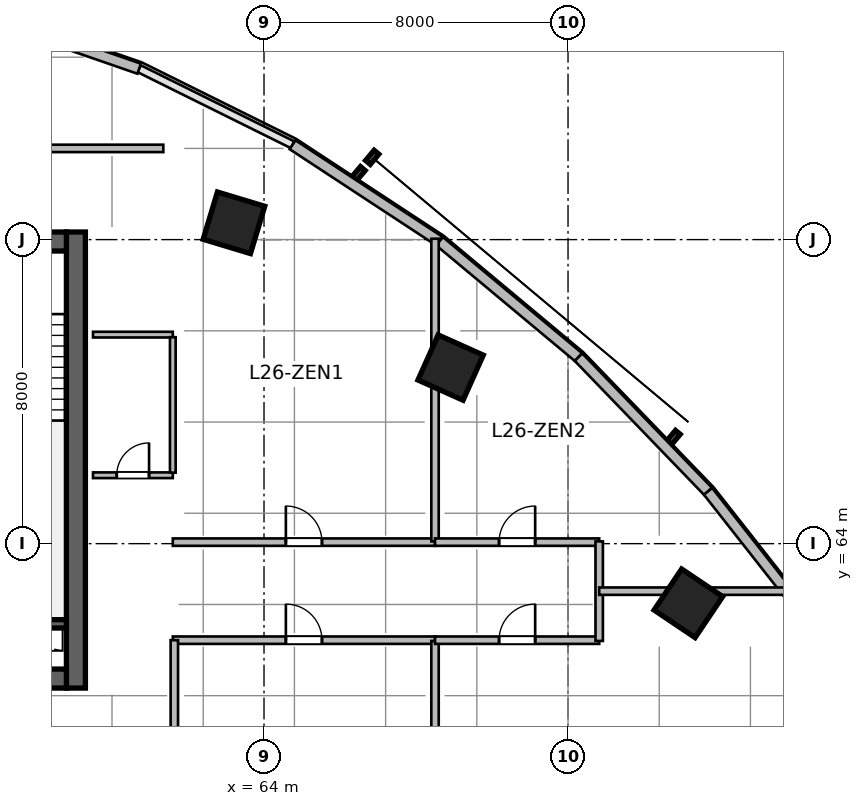
"""IFC4 building model, lengths in metres.
Left out: names, types, materials, properties, quantities, classifications, styles, units other than length and angle.
Written with IfcOpenShell. Run it as: python <this file> out.ifc"""

import sys

from ifc_helpers import new_model, si_unit, direction, frame, frame_2d, origin, origin_2d, place, context, subcontext, project, spatial, rectangle, extrude, source, transform, mapped, element, fill, save


model = new_model("IFC4")
c1 = context("Model", 3, precision=1e-05, world=origin(), true_north=direction((0.0, 1.0)))
c2 = subcontext(c1, "Body", "Model", "MODEL_VIEW")
j1 = project(units=[si_unit("LENGTHUNIT", "METRE"), si_unit("PLANEANGLEUNIT", "RADIAN")], contexts=[c1])
p1 = place(None, origin())
s1 = spatial("IfcSite", under=j1, at=p1, CompositionType="ELEMENT")
p2 = place(p1, origin())
s2 = spatial("IfcBuilding", under=s1, at=p2, CompositionType="ELEMENT")
p3 = place(p2, frame((0.0, 0.0, 111.6)))
s3 = spatial("IfcBuildingStorey", under=s2, at=p3, CompositionType="ELEMENT", Elevation=111.6)
m1 = source(origin(), c2, "Body", "SweptSolid", [
    extrude(rectangle(XDim=12.0, YDim=0.5, at=frame_2d((6.0, 0.0))), origin(), (0.0, 0.0, 1.0), 3.9),
])
p4 = place(p3, frame((59.05, 60.2, 0.0), z_axis=(0.0, 0.0, 1.0), x_axis=(0.0, 1.0, 0.0)))
e1 = element("IfcWall", 1, at=p4, inside=s3, PredefinedType="SHEAR", context=c2, shape_type="MappedRepresentation", body=[
    mapped(m1, transform((0.0, 0.0, 0.0), scale=1.0)),
])
m2 = source(origin(), c2, "Body", "SweptSolid", [
    extrude(rectangle(XDim=21.6, YDim=0.5, at=frame_2d((10.8, 0.0))), origin(), (0.0, 0.0, 1.0), 3.9),
])
p5 = place(p3, frame((37.2, 60.45, 0.0), z_axis=(0.0, 0.0, 1.0), x_axis=(1.0, 0.0, 0.0)))
e2 = element("IfcWall", 2, at=p5, inside=s3, PredefinedType="SHEAR", context=c2, shape_type="MappedRepresentation", body=[
    mapped(m2, transform((0.0, 0.0, 0.0), scale=1.0)),
])
p6 = place(p5, frame((1.1, 0.0, 0.0)))
e3 = element("IfcOpeningElement", 3, at=p6, cuts=e2, PredefinedType="OPENING", context=c2, shape_type="SweptSolid", body=[
    extrude(rectangle(XDim=1.15, YDim=2.15, at=frame_2d((0.575, 1.075))), frame((0.0, 0.26, 0.0), z_axis=(0.0, -1.0, 0.0), x_axis=(1.0, 0.0, 0.0)), (0.0, 0.0, 1.0), 0.52),
])
p7 = place(p5, frame((19.5, 0.0, 0.0)))
e4 = element("IfcOpeningElement", 4, at=p7, cuts=e2, PredefinedType="OPENING", context=c2, shape_type="SweptSolid", body=[
    extrude(rectangle(XDim=0.9, YDim=2.1, at=frame_2d((0.45, 1.05))), frame((0.0, 0.26, 0.0), z_axis=(0.0, -1.0, 0.0), x_axis=(1.0, 0.0, 0.0)), (0.0, 0.0, 1.0), 0.52),
])
p8 = place(p5, frame((12.02, 0.0, 0.0)))
e5 = element("IfcOpeningElement", 5, at=p8, cuts=e2, PredefinedType="OPENING", context=c2, shape_type="SweptSolid", body=[
    extrude(rectangle(XDim=1.6, YDim=2.15, at=frame_2d((0.8, 1.075))), frame((0.0, 0.26, 0.0), z_axis=(0.0, -1.0, 0.0), x_axis=(1.0, 0.0, 0.0)), (0.0, 0.0, 1.0), 0.52),
])
p9 = place(p3, frame((37.2, 71.95, 0.0), z_axis=(0.0, 0.0, 1.0), x_axis=(1.0, 0.0, 0.0)))
e6 = element("IfcWall", 6, at=p9, inside=s3, PredefinedType="SHEAR", context=c2, shape_type="MappedRepresentation", body=[
    mapped(m2, transform((0.0, 0.0, 0.0), scale=1.0)),
])
p10 = place(p9, frame((1.2, 0.0, 0.0)))
e7 = element("IfcOpeningElement", 7, at=p10, cuts=e6, PredefinedType="OPENING", context=c2, shape_type="SweptSolid", body=[
    extrude(rectangle(XDim=0.9, YDim=2.1, at=frame_2d((0.45, 1.05))), frame((0.0, 0.26, 0.0), z_axis=(0.0, -1.0, 0.0), x_axis=(1.0, 0.0, 0.0)), (0.0, 0.0, 1.0), 0.52),
])
p11 = place(p9, frame((14.7, 0.0, 0.0)))
e8 = element("IfcOpeningElement", 8, at=p11, cuts=e6, PredefinedType="OPENING", context=c2, shape_type="SweptSolid", body=[
    extrude(rectangle(XDim=1.2, YDim=2.15, at=frame_2d((0.6, 1.075))), frame((0.0, 0.26, 0.0), z_axis=(0.0, -1.0, 0.0), x_axis=(1.0, 0.0, 0.0)), (0.0, 0.0, 1.0), 0.52),
])
p12 = place(p9, frame((4.15, 0.0, 0.0)))
e9 = element("IfcOpeningElement", 9, at=p12, cuts=e6, PredefinedType="OPENING", context=c2, shape_type="SweptSolid", body=[
    extrude(rectangle(XDim=1.3, YDim=2.15, at=frame_2d((0.65, 1.075))), frame((0.0, 0.26, 0.0), z_axis=(0.0, -1.0, 0.0), x_axis=(1.0, 0.0, 0.0)), (0.0, 0.0, 1.0), 0.52),
])
p13 = place(p9, frame((6.76, 0.0, 0.0)))
e10 = element("IfcOpeningElement", 10, at=p13, cuts=e6, PredefinedType="OPENING", context=c2, shape_type="SweptSolid", body=[
    extrude(rectangle(XDim=0.85, YDim=2.1, at=frame_2d((0.425, 1.05))), frame((0.0, 0.26, 0.0), z_axis=(0.0, -1.0, 0.0), x_axis=(1.0, 0.0, 0.0)), (0.0, 0.0, 1.0), 0.52),
])
p14 = place(p9, frame((8.76, 0.0, 0.0)))
e11 = element("IfcOpeningElement", 11, at=p14, cuts=e6, PredefinedType="OPENING", context=c2, shape_type="SweptSolid", body=[
    extrude(rectangle(XDim=0.85, YDim=2.1, at=frame_2d((0.425, 1.05))), frame((0.0, 0.26, 0.0), z_axis=(0.0, -1.0, 0.0), x_axis=(1.0, 0.0, 0.0)), (0.0, 0.0, 1.0), 0.52),
])
p15 = place(p9, frame((10.725, 0.0, 0.0)))
e12 = element("IfcOpeningElement", 12, at=p15, cuts=e6, PredefinedType="OPENING", context=c2, shape_type="SweptSolid", body=[
    extrude(rectangle(XDim=0.85, YDim=2.1, at=frame_2d((0.425, 1.05))), frame((0.0, 0.26, 0.0), z_axis=(0.0, -1.0, 0.0), x_axis=(1.0, 0.0, 0.0)), (0.0, 0.0, 1.0), 0.52),
])
m3 = source(origin(), c2, "Body", "SweptSolid", [
    extrude(rectangle(XDim=3.27, YDim=0.22, at=frame_2d((1.635, 0.0))), origin(), (0.0, 0.0, 1.0), 3.9),
])
p16 = place(p3, frame((55.53, 61.89, 0.0), z_axis=(0.0, 0.0, 1.0), x_axis=(1.0, 0.0, 0.0)))
e13 = element("IfcWall", 13, at=p16, inside=s3, PredefinedType="SHEAR", context=c2, shape_type="MappedRepresentation", body=[
    mapped(m3, transform((0.0, 0.0, 0.0), scale=1.0)),
])
m4 = source(origin(), c2, "Body", "SweptSolid", [
    extrude(rectangle(XDim=1.3, YDim=1.3, at=origin_2d()), origin(), (0.0, 0.0, 1.0), 3.9),
])
for number, where, z_axis, x_axis in (
    (14, (63.209, 72.442, 0.0), (0.0, 0.0, 1.0), (0.289, 0.957, 0.0)),
    (15, (68.91, 68.633, 0.0), (0.0, 0.0, 1.0), (0.409, 0.912, 0.0)),
    (16, (75.167, 62.43, 0.0), (0.0, 0.0, 1.0), (0.558, 0.83, 0.0)),
):
    element("IfcColumn", number, at=place(p3, frame(where, z_axis=z_axis, x_axis=x_axis)), inside=s3, PredefinedType="COLUMN", context=c2, shape_type="MappedRepresentation", body=[
        mapped(m4, transform((0.0, 0.0, 0.0), scale=1.0)),
    ])
m5 = source(origin(), c2, "Body", "SweptSolid", [
    extrude(rectangle(XDim=4.409, YDim=0.28, at=frame_2d((2.205, 0.0))), origin(), (0.0, 0.0, 1.0), 3.65),
])
p17 = place(p3, frame((56.548, 77.941, 0.0), z_axis=(0.0, 0.0, 1.0), x_axis=(0.944879374121, -0.327418643881, 0.0)))
e17 = element("IfcWall", 17, at=p17, inside=s3, PredefinedType="SOLIDWALL", context=c2, shape_type="MappedRepresentation", body=[
    mapped(m5, transform((0.0, 0.0, 0.0), scale=1.0)),
])
m6 = source(origin(), c2, "Body", "SweptSolid", [
    extrude(rectangle(XDim=4.626, YDim=0.28, at=frame_2d((2.313, 0.0))), origin(), (0.0, 0.0, 1.0), 3.65),
])
p18 = place(p3, frame((64.751, 74.496, 0.0), z_axis=(0.0, 0.0, 1.0), x_axis=(0.83595938331, -0.548791316855, 0.0)))
e18 = element("IfcWall", 18, at=p18, inside=s3, PredefinedType="SOLIDWALL", context=c2, shape_type="MappedRepresentation", body=[
    mapped(m6, transform((0.0, 0.0, 0.0), scale=1.0)),
])
m7 = source(origin(), c2, "Body", "SweptSolid", [
    extrude(rectangle(XDim=4.762, YDim=0.28, at=frame_2d((2.381, 0.0))), origin(), (0.0, 0.0, 1.0), 3.65),
])
p19 = place(p3, frame((68.618, 71.958, 0.0), z_axis=(0.0, 0.0, 1.0), x_axis=(0.767952279762, -0.640507061638, 0.0)))
e19 = element("IfcWall", 19, at=p19, inside=s3, PredefinedType="SOLIDWALL", context=c2, shape_type="MappedRepresentation", body=[
    mapped(m7, transform((0.0, 0.0, 0.0), scale=1.0)),
])
m8 = source(origin(), c2, "Body", "SweptSolid", [
    extrude(rectangle(XDim=4.908, YDim=0.28, at=frame_2d((2.454, 0.0))), origin(), (0.0, 0.0, 1.0), 3.65),
])
p20 = place(p3, frame((72.275, 68.907, 0.0), z_axis=(0.0, 0.0, 1.0), x_axis=(0.694613154328, -0.719383462302, 0.0)))
e20 = element("IfcWall", 20, at=p20, inside=s3, PredefinedType="SOLIDWALL", context=c2, shape_type="MappedRepresentation", body=[
    mapped(m8, transform((0.0, 0.0, 0.0), scale=1.0)),
])
m9 = source(origin(), c2, "Body", "SweptSolid", [
    extrude(rectangle(XDim=5.058, YDim=0.28, at=frame_2d((2.529, 0.0))), origin(), (0.0, 0.0, 1.0), 3.65),
])
p21 = place(p3, frame((75.685, 65.376, 0.0), z_axis=(0.0, 0.0, 1.0), x_axis=(0.618145507434, -0.786063694391, 0.0)))
e21 = element("IfcWall", 21, at=p21, inside=s3, PredefinedType="SOLIDWALL", context=c2, shape_type="MappedRepresentation", body=[
    mapped(m9, transform((0.0, 0.0, 0.0), scale=1.0)),
])
m10 = source(origin(), c2, "Body", "SweptSolid", [
    extrude(rectangle(XDim=2.1, YDim=0.15, at=frame_2d((1.05, 0.0))), origin(), (0.0, 0.0, 1.0), 3.65),
])
p22 = place(p3, frame((59.5, 65.8, 0.0), z_axis=(0.0, 0.0, 1.0), x_axis=(1.0, 0.0, 0.0)))
e22 = element("IfcWall", 22, at=p22, inside=s3, PredefinedType="PARTITIONING", context=c2, shape_type="MappedRepresentation", body=[
    mapped(m10, transform((0.0, 0.0, 0.0), scale=1.0)),
])
p23 = place(p22, frame((0.625, 0.0, 0.0)))
e23 = element("IfcOpeningElement", 23, at=p23, cuts=e22, PredefinedType="OPENING", context=c2, shape_type="SweptSolid", body=[
    extrude(rectangle(XDim=0.85, YDim=2.1, at=frame_2d((0.425, 1.05))), frame((0.0, 0.085, 0.0), z_axis=(0.0, -1.0, 0.0), x_axis=(1.0, 0.0, 0.0)), (0.0, 0.0, 1.0), 0.17),
])
p24 = place(p3, frame((59.5, 69.5, 0.0), z_axis=(0.0, 0.0, 1.0), x_axis=(1.0, 0.0, 0.0)))
e24 = element("IfcWall", 24, at=p24, inside=s3, PredefinedType="PARTITIONING", context=c2, shape_type="MappedRepresentation", body=[
    mapped(m10, transform((0.0, 0.0, 0.0), scale=1.0)),
])
m11 = source(origin(), c2, "Body", "SweptSolid", [
    extrude(rectangle(XDim=3.565, YDim=0.15, at=frame_2d((1.783, 0.0))), origin(), (0.0, 0.0, 1.0), 3.65),
])
p25 = place(p3, frame((61.6, 65.867, 0.0), z_axis=(0.0, 0.0, 1.0), x_axis=(0.0, 1.0, 0.0)))
e25 = element("IfcWall", 25, at=p25, inside=s3, PredefinedType="PARTITIONING", context=c2, shape_type="MappedRepresentation", body=[
    mapped(m11, transform((0.0, 0.0, 0.0), scale=1.0)),
])
m12 = source(origin(), c2, "Body", "SweptSolid", [
    extrude(rectangle(XDim=13.2, YDim=0.195, at=frame_2d((6.6, 0.0))), origin(), (0.0, 0.0, 1.0), 3.022),
])
p26 = place(p3, frame((48.15, 74.4, 0.0), z_axis=(0.0, 0.0, 1.0), x_axis=(1.0, 0.0, 0.0)))
e26 = element("IfcWall", 26, at=p26, inside=s3, PredefinedType="PARTITIONING", context=c2, shape_type="MappedRepresentation", body=[
    mapped(m12, transform((0.0, 0.0, 0.0), scale=1.0)),
])
p27 = place(p26, frame((5.6, 0.0, 0.0)))
e27 = element("IfcOpeningElement", 27, at=p27, cuts=e26, PredefinedType="OPENING", context=c2, shape_type="SweptSolid", body=[
    extrude(rectangle(XDim=1.1, YDim=2.15, at=frame_2d((0.55, 1.075))), frame((0.0, 0.107, 0.0), z_axis=(0.0, -1.0, 0.0), x_axis=(1.0, 0.0, 0.0)), (0.0, 0.0, 1.0), 0.215),
])
m13 = source(origin(), c2, "Body", "SweptSolid", [
    extrude(rectangle(XDim=6.9, YDim=0.195, at=frame_2d((3.45, 0.0))), origin(), (0.0, 0.0, 1.0), 3.65),
])
p28 = place(p3, frame((61.6, 64.04, 0.0), z_axis=(0.0, 0.0, 1.0), x_axis=(1.0, 0.0, 0.0)))
e28 = element("IfcWall", 28, at=p28, inside=s3, PredefinedType="PARTITIONING", context=c2, shape_type="MappedRepresentation", body=[
    mapped(m13, transform((0.0, 0.0, 0.0), scale=1.0)),
])
p29 = place(p28, frame((2.975, 0.0, 0.0)))
e29 = element("IfcOpeningElement", 29, at=p29, cuts=e28, PredefinedType="OPENING", context=c2, shape_type="SweptSolid", body=[
    extrude(rectangle(XDim=0.95, YDim=2.1, at=frame_2d((0.475, 1.05))), frame((0.0, 0.107, 0.0), z_axis=(0.0, -1.0, 0.0), x_axis=(1.0, 0.0, 0.0)), (0.0, 0.0, 1.0), 0.215),
])
m14 = source(origin(), c2, "Body", "SweptSolid", [
    extrude(rectangle(XDim=7.963, YDim=0.195, at=frame_2d((3.982, 0.0))), origin(), (0.0, 0.0, 1.0), 2.942),
])
p30 = place(p3, frame((68.5, 64.06, 0.0), z_axis=(0.0, 0.0, 1.0), x_axis=(0.0, 1.0, 0.0)))
e30 = element("IfcWall", 30, at=p30, inside=s3, PredefinedType="PARTITIONING", context=c2, shape_type="MappedRepresentation", body=[
    mapped(m14, transform((0.0, 0.0, 0.0), scale=1.0)),
])
m15 = source(origin(), c2, "Body", "SweptSolid", [
    extrude(rectangle(XDim=4.32, YDim=0.195, at=frame_2d((2.16, 0.0))), origin(), (0.0, 0.0, 1.0), 3.65),
])
p31 = place(p3, frame((68.5, 64.04, 0.0), z_axis=(0.0, 0.0, 1.0), x_axis=(1.0, 0.0, 0.0)))
e31 = element("IfcWall", 31, at=p31, inside=s3, PredefinedType="PARTITIONING", context=c2, shape_type="MappedRepresentation", body=[
    mapped(m15, transform((0.0, 0.0, 0.0), scale=1.0)),
])
p32 = place(p31, frame((1.685, 0.0, 0.0)))
e32 = element("IfcOpeningElement", 32, at=p32, cuts=e31, PredefinedType="OPENING", context=c2, shape_type="SweptSolid", body=[
    extrude(rectangle(XDim=0.95, YDim=2.1, at=frame_2d((0.475, 1.05))), frame((0.0, 0.107, 0.0), z_axis=(0.0, -1.0, 0.0), x_axis=(1.0, 0.0, 0.0)), (0.0, 0.0, 1.0), 0.215),
])
p33 = place(p3, frame((61.6, 61.46, 0.0), z_axis=(0.0, 0.0, 1.0), x_axis=(1.0, 0.0, 0.0)))
e33 = element("IfcWall", 33, at=p33, inside=s3, PredefinedType="PARTITIONING", context=c2, shape_type="MappedRepresentation", body=[
    mapped(m13, transform((0.0, 0.0, 0.0), scale=1.0)),
])
p34 = place(p33, frame((2.975, 0.0, 0.0)))
e34 = element("IfcOpeningElement", 34, at=p34, cuts=e33, PredefinedType="OPENING", context=c2, shape_type="SweptSolid", body=[
    extrude(rectangle(XDim=0.95, YDim=2.1, at=frame_2d((0.475, 1.05))), frame((0.0, 0.107, 0.0), z_axis=(0.0, -1.0, 0.0), x_axis=(1.0, 0.0, 0.0)), (0.0, 0.0, 1.0), 0.215),
])
m16 = source(origin(), c2, "Body", "SweptSolid", [
    extrude(rectangle(XDim=23.346, YDim=0.195, at=frame_2d((11.673, 0.0))), origin(), (0.0, 0.0, 1.0), 2.942),
])
p35 = place(p3, frame((68.5, 38.094, 0.0), z_axis=(0.0, 0.0, 1.0), x_axis=(0.0, 1.0, 0.0)))
e35 = element("IfcWall", 35, at=p35, inside=s3, PredefinedType="PARTITIONING", context=c2, shape_type="MappedRepresentation", body=[
    mapped(m16, transform((0.0, 0.0, 0.0), scale=1.0)),
])
p36 = place(p3, frame((68.5, 61.46, 0.0), z_axis=(0.0, 0.0, 1.0), x_axis=(1.0, 0.0, 0.0)))
e36 = element("IfcWall", 36, at=p36, inside=s3, PredefinedType="PARTITIONING", context=c2, shape_type="MappedRepresentation", body=[
    mapped(m15, transform((0.0, 0.0, 0.0), scale=1.0)),
])
p37 = place(p36, frame((1.685, 0.0, 0.0)))
e37 = element("IfcOpeningElement", 37, at=p37, cuts=e36, PredefinedType="OPENING", context=c2, shape_type="SweptSolid", body=[
    extrude(rectangle(XDim=0.95, YDim=2.1, at=frame_2d((0.475, 1.05))), frame((0.0, 0.107, 0.0), z_axis=(0.0, -1.0, 0.0), x_axis=(1.0, 0.0, 0.0)), (0.0, 0.0, 1.0), 0.215),
])
m17 = source(origin(), c2, "Body", "SweptSolid", [
    extrude(rectangle(XDim=13.988, YDim=0.195, at=frame_2d((6.994, 0.0))), origin(), (0.0, 0.0, 1.0), 2.942),
])
p38 = place(p3, frame((61.64, 47.472, 0.0), z_axis=(0.0, 0.0, 1.0), x_axis=(0.0, 1.0, 0.0)))
e38 = element("IfcWall", 38, at=p38, inside=s3, PredefinedType="PARTITIONING", context=c2, shape_type="MappedRepresentation", body=[
    mapped(m17, transform((0.0, 0.0, 0.0), scale=1.0)),
])
m18 = source(origin(), c2, "Body", "SweptSolid", [
    extrude(rectangle(XDim=2.62, YDim=0.195, at=frame_2d((1.31, 0.0))), origin(), (0.0, 0.0, 1.0), 3.324),
])
p39 = place(p3, frame((72.82, 61.44, 0.0), z_axis=(0.0, 0.0, 1.0), x_axis=(0.0, 1.0, 0.0)))
e39 = element("IfcWall", 39, at=p39, inside=s3, PredefinedType="PARTITIONING", context=c2, shape_type="MappedRepresentation", body=[
    mapped(m18, transform((0.0, 0.0, 0.0), scale=1.0)),
])
m19 = source(origin(), c2, "Body", "SweptSolid", [
    extrude(rectangle(XDim=4.917, YDim=0.195, at=frame_2d((2.459, 0.0))), origin(), (0.0, 0.0, 1.0), 3.65),
])
p40 = place(p3, frame((72.82, 62.75, 0.0), z_axis=(0.0, 0.0, 1.0), x_axis=(1.0, 0.0, 0.0)))
e40 = element("IfcWall", 40, at=p40, inside=s3, PredefinedType="PARTITIONING", context=c2, shape_type="MappedRepresentation", body=[
    mapped(m19, transform((0.0, 0.0, 0.0), scale=1.0)),
])
m20 = source(origin(), c2, "Body", "SweptSolid", [
    extrude(rectangle(XDim=0.85, YDim=2.1, at=frame_2d((0.425, 1.05))), frame((0.0, 0.025, 0.0), z_axis=(0.0, -1.0, 0.0), x_axis=(1.0, 0.0, 0.0)), (0.0, 0.0, 1.0), 0.05),
])
p41 = place(p23, origin())
e41 = element("IfcDoor", 41, at=p41, inside=s3, OperationType="SINGLE_SWING_RIGHT", PredefinedType="DOOR", context=c2, shape_type="MappedRepresentation", body=[
    mapped(m20, transform((0.0, 0.0, 0.0), scale=1.0)),
])
fill(e23, e41)
m21 = source(origin(), c2, "Body", "SweptSolid", [
    extrude(rectangle(XDim=0.95, YDim=2.1, at=frame_2d((0.475, 1.05))), frame((0.0, 0.025, 0.0), z_axis=(0.0, -1.0, 0.0), x_axis=(1.0, 0.0, 0.0)), (0.0, 0.0, 1.0), 0.05),
])
p42 = place(p29, origin())
e42 = element("IfcDoor", 42, at=p42, inside=s3, OperationType="SINGLE_SWING_LEFT", PredefinedType="DOOR", context=c2, shape_type="MappedRepresentation", body=[
    mapped(m21, transform((0.0, 0.0, 0.0), scale=1.0)),
])
fill(e29, e42)
p43 = place(p32, origin())
e43 = element("IfcDoor", 43, at=p43, inside=s3, OperationType="SINGLE_SWING_RIGHT", PredefinedType="DOOR", context=c2, shape_type="MappedRepresentation", body=[
    mapped(m21, transform((0.0, 0.0, 0.0), scale=1.0)),
])
fill(e32, e43)
p44 = place(p34, origin())
e44 = element("IfcDoor", 44, at=p44, inside=s3, OperationType="SINGLE_SWING_LEFT", PredefinedType="DOOR", context=c2, shape_type="MappedRepresentation", body=[
    mapped(m21, transform((0.0, 0.0, 0.0), scale=1.0)),
])
fill(e34, e44)
p45 = place(p37, origin())
e45 = element("IfcDoor", 45, at=p45, inside=s3, OperationType="SINGLE_SWING_RIGHT", PredefinedType="DOOR", context=c2, shape_type="MappedRepresentation", body=[
    mapped(m21, transform((0.0, 0.0, 0.0), scale=1.0)),
])
fill(e37, e45)
save(model, sys.argv[1])
